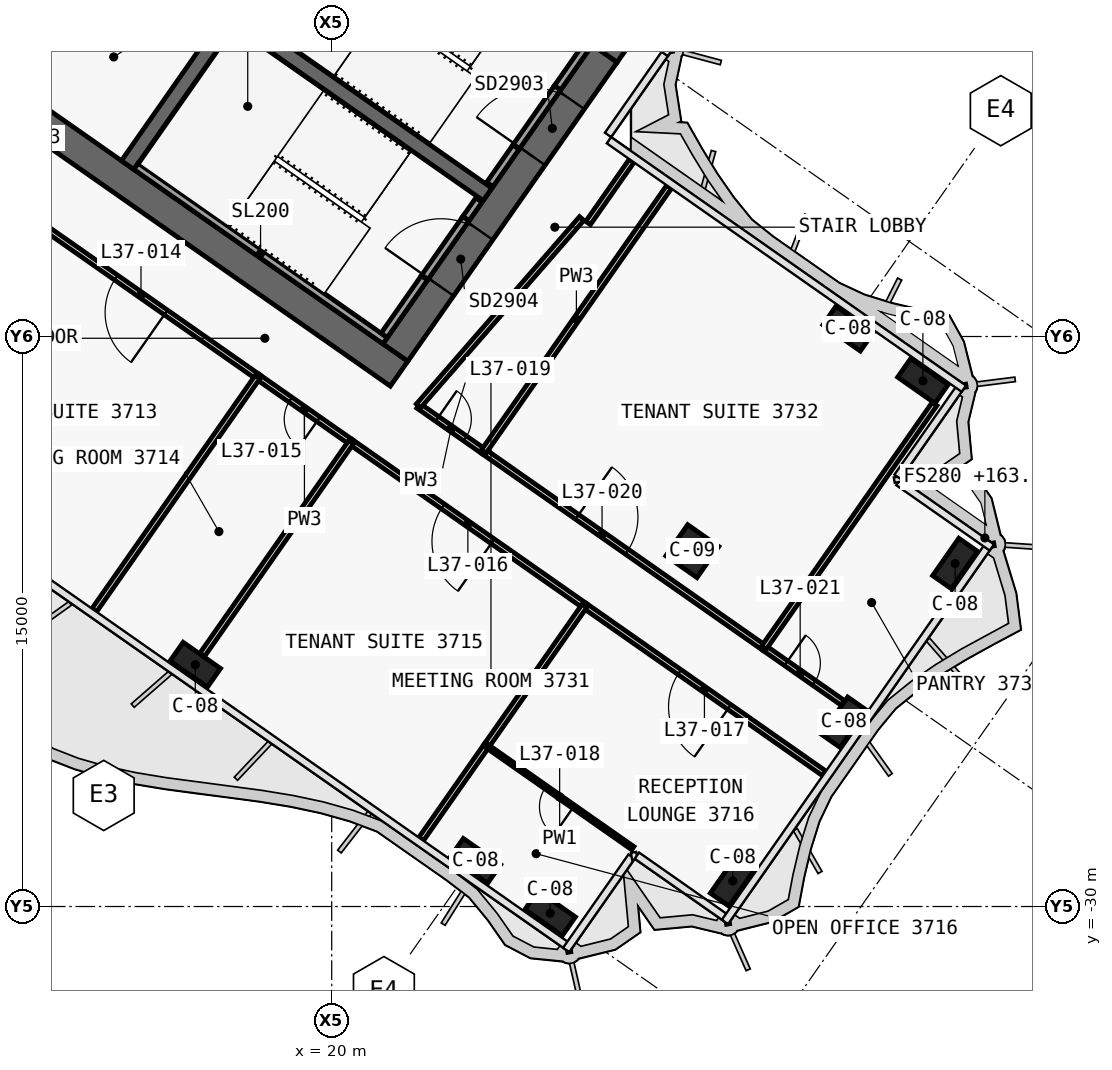
"""IFC4 building model, lengths in metres.
Left out: names, types, materials, properties, quantities, classifications, styles, units other than length and angle.
Written with IfcOpenShell. Run it as: python <this file> out.ifc"""

import sys

from ifc_helpers import new_model, si_unit, direction, frame, frame_2d, origin, origin_2d, place, context, subcontext, project, spatial, polyline, rectangle, outline, extrude, element, fill, save


model = new_model("IFC4")
c1 = context("Model", 3, precision=1e-05, world=origin(), true_north=direction((0.0, 1.0)))
c2 = subcontext(c1, "Body", "Model", "MODEL_VIEW")
j1 = project(units=[si_unit("LENGTHUNIT", "METRE"), si_unit("PLANEANGLEUNIT", "RADIAN")], contexts=[c1])
p1 = place(None, origin())
s1 = spatial("IfcSite", under=j1, at=p1, CompositionType="ELEMENT")
p2 = place(p1, origin())
s2 = spatial("IfcBuilding", under=s1, at=p2, CompositionType="ELEMENT")
p3 = place(p2, frame((0.0, 0.0, 163.2)))
s3 = spatial("IfcBuildingStorey", under=s2, at=p3, CompositionType="ELEMENT", Elevation=163.2)
p4 = place(p3, frame((-0.029, 11.984, 0.0), z_axis=(0.0, 0.0, 1.0), x_axis=(0.819151382952, -0.573577380837, 0.0)))
e1 = element("IfcWall", 1, at=p4, inside=s3, PredefinedType="SHEAR", context=c2, shape_type="SweptSolid", body=[
    extrude(outline(polyline([(33.898, 0.4), (-0.0, 0.4), (0.56, -0.4), (33.898, -0.4), (33.898, 0.4)])), origin(), (0.0, 0.0, 1.0), 3.9),
])
p5 = place(p3, frame((-0.029, -0.712, 0.0), z_axis=(0.0, 0.0, 1.0), x_axis=(0.819151758019, -0.573576845187, 0.0)))
e2 = element("IfcWall", 2, at=p5, inside=s3, PredefinedType="SHEAR", context=c2, shape_type="SweptSolid", body=[
    extrude(outline(polyline([(26.616, 0.4), (-0.0, 0.4), (0.56, -0.4), (26.616, -0.4), (26.616, 0.4)])), origin(), (0.0, 0.0, 1.0), 3.9),
])
p6 = place(p5, frame((6.666, 0.0, 0.0)))
e3 = element("IfcOpeningElement", 3, at=p6, cuts=e2, PredefinedType="OPENING", context=c2, shape_type="SweptSolid", body=[
    extrude(rectangle(XDim=1.5, YDim=2.1, at=frame_2d((0.75, 1.05))), frame((0.0, 0.41, 0.0), z_axis=(0.0, -1.0, 0.0), x_axis=(1.0, 0.0, 0.0)), (0.0, 0.0, 1.0), 0.82),
])
p7 = place(p5, frame((12.366, 0.0, 0.0)))
e4 = element("IfcOpeningElement", 4, at=p7, cuts=e2, PredefinedType="OPENING", context=c2, shape_type="SweptSolid", body=[
    extrude(rectangle(XDim=1.5, YDim=2.1, at=frame_2d((0.75, 1.05))), frame((0.0, 0.41, 0.0), z_axis=(0.0, -1.0, 0.0), x_axis=(1.0, 0.0, 0.0)), (0.0, 0.0, 1.0), 0.82),
])
p8 = place(p3, frame((21.675, -15.421, 0.0), z_axis=(0.0, 0.0, 1.0), x_axis=(0.573581815061, 0.819148278049, 0.0)))
e5 = element("IfcWall", 5, at=p8, inside=s3, PredefinedType="SHEAR", context=c2, shape_type="SweptSolid", body=[
    extrude(outline(polyline([(9.6, 0.4), (0.0, 0.4), (0.0, -0.4), (9.6, -0.4), (9.6, 0.4)])), origin(), (0.0, 0.0, 1.0), 3.9),
])
p9 = place(p8, frame((6.3, 0.0, 0.0)))
e6 = element("IfcOpeningElement", 6, at=p9, cuts=e5, PredefinedType="OPENING", context=c2, shape_type="SweptSolid", body=[
    extrude(rectangle(XDim=1.8, YDim=2.1, at=frame_2d((0.9, 1.05))), frame((0.0, 0.41, 0.0), z_axis=(0.0, -1.0, 0.0), x_axis=(1.0, 0.0, 0.0)), (0.0, 0.0, 1.0), 0.82),
])
p10 = place(p8, frame((2.1, 0.0, 0.0)))
e7 = element("IfcOpeningElement", 7, at=p10, cuts=e5, PredefinedType="OPENING", context=c2, shape_type="SweptSolid", body=[
    extrude(rectangle(XDim=1.8, YDim=2.1, at=frame_2d((0.9, 1.05))), frame((0.0, 0.41, 0.0), z_axis=(0.0, -1.0, 0.0), x_axis=(1.0, 0.0, 0.0)), (0.0, 0.0, 1.0), 0.82),
])
p11 = place(p3, frame((14.63, -10.488, 0.0), z_axis=(0.0, 0.0, 1.0), x_axis=(0.573611936273, 0.819127185829, 0.0)))
e8 = element("IfcWall", 8, at=p11, inside=s3, PredefinedType="SHEAR", context=c2, shape_type="SweptSolid", body=[
    extrude(outline(polyline([(0.0, 0.2), (0.0, -0.2), (4.6, -0.2), (4.6, 0.2), (0.0, 0.2)])), origin(), (0.0, 0.0, 1.0), 3.9),
])
p12 = place(p3, frame((2.638, 3.768, 0.0), z_axis=(0.0, 0.0, 1.0), x_axis=(0.81915267502, -0.573575535572, 0.0)))
e9 = element("IfcWall", 9, at=p12, inside=s3, PredefinedType="SHEAR", context=c2, shape_type="SweptSolid", body=[
    extrude(outline(polyline([(0.0, 0.2), (0.0, -0.2), (26.2, -0.2), (26.2, 0.2), (0.0, 0.2)])), origin(), (0.0, 0.0, 1.0), 3.9),
])
p13 = place(p12, frame((9.637, 0.0, 0.0)))
e10 = element("IfcOpeningElement", 10, at=p13, cuts=e9, PredefinedType="OPENING", context=c2, shape_type="SweptSolid", body=[
    extrude(rectangle(XDim=1.2, YDim=2.1, at=frame_2d((0.6, 1.05))), frame((0.0, 0.21, 0.0), z_axis=(0.0, -1.0, 0.0), x_axis=(1.0, 0.0, 0.0)), (0.0, 0.0, 1.0), 0.42),
])
p14 = place(p12, frame((11.812, 0.0, 0.0)))
e11 = element("IfcOpeningElement", 11, at=p14, cuts=e9, PredefinedType="OPENING", context=c2, shape_type="SweptSolid", body=[
    extrude(rectangle(XDim=1.2, YDim=2.1, at=frame_2d((0.6, 1.05))), frame((0.0, 0.21, 0.0), z_axis=(0.0, -1.0, 0.0), x_axis=(1.0, 0.0, 0.0)), (0.0, 0.0, 1.0), 0.42),
])
p15 = place(p12, frame((13.988, 0.0, 0.0)))
e12 = element("IfcOpeningElement", 12, at=p15, cuts=e9, PredefinedType="OPENING", context=c2, shape_type="SweptSolid", body=[
    extrude(rectangle(XDim=1.2, YDim=2.1, at=frame_2d((0.6, 1.05))), frame((0.0, 0.21, 0.0), z_axis=(0.0, -1.0, 0.0), x_axis=(1.0, 0.0, 0.0)), (0.0, 0.0, 1.0), 0.42),
])
p16 = place(p12, frame((16.262, 0.0, 0.0)))
e13 = element("IfcOpeningElement", 13, at=p16, cuts=e9, PredefinedType="OPENING", context=c2, shape_type="SweptSolid", body=[
    extrude(rectangle(XDim=1.0, YDim=2.1, at=frame_2d((0.5, 1.05))), frame((0.0, 0.21, 0.0), z_axis=(0.0, -1.0, 0.0), x_axis=(1.0, 0.0, 0.0)), (0.0, 0.0, 1.0), 0.42),
])
for number, where, z_axis, x_axis in (
    (14, (16.41, -23.637, 0.0), (0.0, 0.0, 1.0), (0.819, -0.574, 0.0)),
    (15, (23.782, -28.799, 0.0), (0.0, 0.0, 1.0), (0.819, -0.574, 0.0)),
    (16, (25.748, -30.176, 0.0), (0.0, 0.0, 1.0), (0.819, -0.574, 0.0)),
    (17, (33.591, -14.792, 0.0), (0.0, 0.0, 1.0), (0.819, -0.574, 0.0)),
    (18, (35.556, -16.168, 0.0), (0.0, 0.0, 1.0), (0.819, -0.574, 0.0)),
    (19, (30.553, -29.329, 0.0), (0.0, 0.0, 1.0), (0.574, 0.819, 0.0)),
    (20, (33.479, -25.151, 0.0), (0.0, 0.0, 1.0), (0.574, 0.819, 0.0)),
    (21, (36.404, -20.973, 0.0), (0.0, 0.0, 1.0), (0.574, 0.819, 0.0)),
):
    element("IfcColumn", number, at=place(p3, frame(where, z_axis=z_axis, x_axis=x_axis)), inside=s3, PredefinedType="COLUMN", context=c2, shape_type="SweptSolid", body=[
        extrude(rectangle(XDim=1.2, YDim=0.6, at=origin_2d()), origin(), (0.0, 0.0, 1.0), 3.9),
    ])
p17 = place(p3, frame((29.49, -20.649, 0.0), z_axis=(0.0, 0.0, 1.0), x_axis=(0.819152044289, -0.573576436351, 0.0)))
e22 = element("IfcColumn", 22, at=p17, inside=s3, PredefinedType="COLUMN", context=c2, shape_type="SweptSolid", body=[
    extrude(rectangle(XDim=1.0, YDim=1.0, at=origin_2d()), origin(), (0.0, 0.0, 1.0), 3.9),
])
p18 = place(p3, frame((24.162, -10.998, 0.0), z_axis=(0.0, 0.0, 1.0), x_axis=(0.573612502218, 0.819126789514, 0.0)))
e23 = element("IfcWall", 23, at=p18, inside=s3, PredefinedType="SOLIDWALL", context=c2, shape_type="SweptSolid", body=[
    extrude(rectangle(XDim=1.2, YDim=0.2, at=frame_2d((0.6, 0.0))), origin(), (0.0, 0.0, 1.0), 3.62),
])
p19 = place(p3, frame((25.94, -8.458, 0.0), z_axis=(0.0, 0.0, 1.0), x_axis=(0.573619628835, 0.819121798889, 0.0)))
e24 = element("IfcWall", 24, at=p19, inside=s3, PredefinedType="SOLIDWALL", context=c2, shape_type="SweptSolid", body=[
    extrude(rectangle(XDim=1.25, YDim=0.2, at=frame_2d((0.625, 0.0))), origin(), (0.0, 0.0, 1.0), 3.62),
])
p20 = place(p3, frame((24.85, -10.014, 2.15), z_axis=(0.0, 0.0, 1.0), x_axis=(0.573505465124, 0.819201734296, 0.0)))
e25 = element("IfcWall", 25, at=p20, inside=s3, PredefinedType="SOLIDWALL", context=c2, shape_type="SweptSolid", body=[
    extrude(rectangle(XDim=1.9, YDim=0.2, at=frame_2d((0.95, 0.0))), origin(), (0.0, 0.0, 1.0), 1.47),
])
p21 = place(p3, frame((14.851, -10.521, 0.0), z_axis=(0.0, 0.0, 1.0), x_axis=(0.819141584393, -0.57359137434, 0.0)))
e26 = element("IfcWall", 26, at=p21, inside=s3, PredefinedType="SOLIDWALL", context=c2, shape_type="SweptSolid", body=[
    extrude(rectangle(XDim=8.0, YDim=0.2, at=frame_2d((4.0, 0.0))), origin(), (0.0, 0.0, 1.0), 3.62),
])
p22 = place(p3, frame((21.38, -14.97, 0.0), z_axis=(0.0, 0.0, 1.0), x_axis=(0.573559770908, 0.819163713305, 0.0)))
e27 = element("IfcWall", 27, at=p22, inside=s3, PredefinedType="SOLIDWALL", context=c2, shape_type="SweptSolid", body=[
    extrude(rectangle(XDim=1.85, YDim=0.2, at=frame_2d((0.925, 0.0))), origin(), (0.0, 0.0, 1.0), 3.62),
])
p23 = place(p3, frame((23.531, -11.898, 0.0), z_axis=(0.0, 0.0, 1.0), x_axis=(0.573708088123, 0.819059844958, 0.0)))
e28 = element("IfcWall", 28, at=p23, inside=s3, PredefinedType="SOLIDWALL", context=c2, shape_type="SweptSolid", body=[
    extrude(rectangle(XDim=0.6, YDim=0.2, at=frame_2d((0.3, 0.0))), origin(), (0.0, 0.0, 1.0), 3.62),
])
p24 = place(p3, frame((22.441, -13.455, 2.15), z_axis=(0.0, 0.0, 1.0), x_axis=(0.573591692345, 0.819141361715, 0.0)))
e29 = element("IfcWall", 29, at=p24, inside=s3, PredefinedType="SOLIDWALL", context=c2, shape_type="SweptSolid", body=[
    extrude(rectangle(XDim=1.9, YDim=0.2, at=frame_2d((0.95, 0.0))), origin(), (0.0, 0.0, 1.0), 1.47),
])
p25 = place(p3, frame((22.283, -16.824, 0.0), z_axis=(0.0, 0.0, 1.0), x_axis=(0.819182738768, -0.573532597595, 0.0)))
e30 = element("IfcWall", 30, at=p25, inside=s3, PredefinedType="PARTITIONING", context=c2, shape_type="SweptSolid", body=[
    extrude(rectangle(XDim=2.099, YDim=0.15, at=frame_2d((1.05, 0.0))), origin(), (0.0, 0.0, 1.0), 3.0),
])
p26 = place(p25, frame((0.6, 0.0, 0.0)))
e31 = element("IfcOpeningElement", 31, at=p26, cuts=e30, PredefinedType="OPENING", context=c2, shape_type="SweptSolid", body=[
    extrude(rectangle(XDim=0.9, YDim=2.1, at=frame_2d((0.45, 1.05))), frame((0.0, 0.085, 0.0), z_axis=(0.0, -1.0, 0.0), x_axis=(1.0, 0.0, 0.0)), (0.0, 0.0, 1.0), 0.17),
])
p27 = place(p3, frame((23.999, -18.025, 0.0), z_axis=(0.0, 0.0, 1.0), x_axis=(0.819164400877, -0.57355878891, 0.0)))
e32 = element("IfcWall", 32, at=p27, inside=s3, PredefinedType="PARTITIONING", context=c2, shape_type="SweptSolid", body=[
    extrude(rectangle(XDim=9.004, YDim=0.15, at=frame_2d((4.502, 0.0))), origin(), (0.0, 0.0, 1.0), 3.0),
])
p28 = place(p27, frame((3.002, 0.0, 0.0)))
e33 = element("IfcOpeningElement", 33, at=p28, cuts=e32, PredefinedType="OPENING", context=c2, shape_type="SweptSolid", body=[
    extrude(rectangle(XDim=1.6, YDim=2.1, at=frame_2d((0.8, 1.05))), frame((0.0, 0.085, 0.0), z_axis=(0.0, -1.0, 0.0), x_axis=(1.0, 0.0, 0.0)), (0.0, 0.0, 1.0), 0.17),
])
p29 = place(p3, frame((31.372, -23.188, 0.0), z_axis=(0.0, 0.0, 1.0), x_axis=(0.819150379241, -0.573578814278, 0.0)))
e34 = element("IfcWall", 34, at=p29, inside=s3, PredefinedType="PARTITIONING", context=c2, shape_type="SweptSolid", body=[
    extrude(rectangle(XDim=2.532, YDim=0.15, at=frame_2d((1.266, 0.0))), origin(), (0.0, 0.0, 1.0), 3.0),
])
p30 = place(p29, frame((0.716, 0.0, 0.0)))
e35 = element("IfcOpeningElement", 35, at=p30, cuts=e34, PredefinedType="OPENING", context=c2, shape_type="SweptSolid", body=[
    extrude(rectangle(XDim=0.9, YDim=2.1, at=frame_2d((0.45, 1.05))), frame((0.0, 0.085, 0.0), z_axis=(0.0, -1.0, 0.0), x_axis=(1.0, 0.0, 0.0)), (0.0, 0.0, 1.0), 0.17),
])
p31 = place(p3, frame((18.055, -16.061, 0.0), z_axis=(0.0, 0.0, 1.0), x_axis=(-0.819164661457, 0.573558416746, 0.0)))
e36 = element("IfcWall", 36, at=p31, inside=s3, PredefinedType="PARTITIONING", context=c2, shape_type="SweptSolid", body=[
    extrude(rectangle(XDim=7.504, YDim=0.15, at=frame_2d((3.752, 0.0))), origin(), (0.0, 0.0, 1.0), 3.0),
])
p32 = place(p31, frame((2.952, 0.0, 0.0)))
e37 = element("IfcOpeningElement", 37, at=p32, cuts=e36, PredefinedType="OPENING", context=c2, shape_type="SweptSolid", body=[
    extrude(rectangle(XDim=1.6, YDim=2.1, at=frame_2d((0.8, 1.05))), frame((0.0, 0.085, 0.0), z_axis=(0.0, -1.0, 0.0), x_axis=(1.0, 0.0, 0.0)), (0.0, 0.0, 1.0), 0.17),
])
p33 = place(p3, frame((20.513, -17.781, 0.0), z_axis=(0.0, 0.0, 1.0), x_axis=(-0.819128818764, 0.573609604409, 0.0)))
e38 = element("IfcWall", 38, at=p33, inside=s3, PredefinedType="PARTITIONING", context=c2, shape_type="SweptSolid", body=[
    extrude(rectangle(XDim=3.004, YDim=0.15, at=frame_2d((1.502, 0.0))), origin(), (0.0, 0.0, 1.0), 3.0),
])
p34 = place(p33, frame((1.052, 0.0, 0.0)))
e39 = element("IfcOpeningElement", 39, at=p34, cuts=e38, PredefinedType="OPENING", context=c2, shape_type="SweptSolid", body=[
    extrude(rectangle(XDim=0.9, YDim=2.1, at=frame_2d((0.45, 1.05))), frame((0.0, 0.085, 0.0), z_axis=(0.0, -1.0, 0.0), x_axis=(1.0, 0.0, 0.0)), (0.0, 0.0, 1.0), 0.17),
])
p35 = place(p3, frame((26.656, -22.083, 0.0), z_axis=(0.0, 0.0, 1.0), x_axis=(-0.819138671238, 0.573595534573, 0.0)))
e40 = element("IfcWall", 40, at=p35, inside=s3, PredefinedType="PARTITIONING", context=c2, shape_type="SweptSolid", body=[
    extrude(rectangle(XDim=7.504, YDim=0.15, at=frame_2d((3.752, 0.0))), origin(), (0.0, 0.0, 1.0), 3.0),
])
p36 = place(p35, frame((2.952, 0.0, 0.0)))
e41 = element("IfcOpeningElement", 41, at=p36, cuts=e40, PredefinedType="OPENING", context=c2, shape_type="SweptSolid", body=[
    extrude(rectangle(XDim=1.6, YDim=2.1, at=frame_2d((0.8, 1.05))), frame((0.0, 0.085, 0.0), z_axis=(0.0, -1.0, 0.0), x_axis=(1.0, 0.0, 0.0)), (0.0, 0.0, 1.0), 0.17),
])
p37 = place(p3, frame((32.962, -26.499, 0.0), z_axis=(0.0, 0.0, 1.0), x_axis=(-0.819148517565, 0.573581473003, 0.0)))
e42 = element("IfcWall", 42, at=p37, inside=s3, PredefinedType="PARTITIONING", context=c2, shape_type="SweptSolid", body=[
    extrude(rectangle(XDim=7.702, YDim=0.15, at=frame_2d((3.851, 0.0))), origin(), (0.0, 0.0, 1.0), 2.9),
])
p38 = place(p37, frame((3.051, 0.0, 0.0)))
e43 = element("IfcOpeningElement", 43, at=p38, cuts=e42, PredefinedType="OPENING", context=c2, shape_type="SweptSolid", body=[
    extrude(rectangle(XDim=1.6, YDim=2.1, at=frame_2d((0.8, 1.05))), frame((0.0, 0.085, 0.0), z_axis=(0.0, -1.0, 0.0), x_axis=(1.0, 0.0, 0.0)), (0.0, 0.0, 1.0), 0.17),
])
p39 = place(p3, frame((28.876, -11.064, 0.0), z_axis=(0.0, 0.0, 1.0), x_axis=(-0.573591492816, -0.819141501433, 0.0)))
e44 = element("IfcWall", 44, at=p39, inside=s3, PredefinedType="PARTITIONING", context=c2, shape_type="SweptSolid", body=[
    extrude(rectangle(XDim=8.5, YDim=0.15, at=frame_2d((4.25, 0.0))), origin(), (0.0, 0.0, 1.0), 3.0),
])
p40 = place(p3, frame((22.285, -16.825, 0.0), z_axis=(0.0, 0.0, 1.0), x_axis=(0.656781429942, 0.754080999153, 0.0)))
e45 = element("IfcWall", 45, at=p40, inside=s3, PredefinedType="PARTITIONING", context=c2, shape_type="SweptSolid", body=[
    extrude(rectangle(XDim=6.536, YDim=0.15, at=frame_2d((3.268, 0.0))), origin(), (0.0, 0.0, 1.0), 3.0),
])
p41 = place(p3, frame((26.746, -12.014, 0.0), z_axis=(0.0, 0.0, 1.0), x_axis=(0.573568836472, 0.819157365729, 0.0)))
e46 = element("IfcWall", 46, at=p41, inside=s3, PredefinedType="PARTITIONING", context=c2, shape_type="SweptSolid", body=[
    extrude(rectangle(XDim=2.0, YDim=0.15, at=frame_2d((1.0, 0.0))), origin(), (0.0, 0.0, 1.0), 3.0),
])
p42 = place(p3, frame((35.865, -16.775, 0.0), z_axis=(0.0, 0.0, 1.0), x_axis=(-0.573579523489, -0.819149882643, 0.0)))
e47 = element("IfcWall", 47, at=p42, inside=s3, PredefinedType="PARTITIONING", context=c2, shape_type="SweptSolid", body=[
    extrude(rectangle(XDim=7.83, YDim=0.15, at=frame_2d((3.915, 0.0))), origin(), (0.0, 0.0, 1.0), 2.9),
])
p43 = place(p3, frame((18.054, -16.06, 0.0), z_axis=(0.0, 0.0, 1.0), x_axis=(-0.573597787563, -0.819137093595, 0.0)))
e48 = element("IfcWall", 48, at=p43, inside=s3, PredefinedType="PARTITIONING", context=c2, shape_type="SweptSolid", body=[
    extrude(rectangle(XDim=7.5, YDim=0.15, at=frame_2d((3.75, 0.0))), origin(), (0.0, 0.0, 1.0), 2.9),
])
p44 = place(p3, frame((20.511, -17.78, 0.0), z_axis=(0.0, 0.0, 1.0), x_axis=(-0.573577493031, -0.819151304393, 0.0)))
e49 = element("IfcWall", 49, at=p44, inside=s3, PredefinedType="PARTITIONING", context=c2, shape_type="SweptSolid", body=[
    extrude(rectangle(XDim=6.83, YDim=0.15, at=frame_2d((3.415, 0.0))), origin(), (0.0, 0.0, 1.0), 3.0),
])
p45 = place(p3, frame((24.074, -25.767, 0.0), z_axis=(0.0, 0.0, 1.0), x_axis=(-0.573609750632, -0.819128716369, 0.0)))
e50 = element("IfcWall", 50, at=p45, inside=s3, PredefinedType="PARTITIONING", context=c2, shape_type="SweptSolid", body=[
    extrude(rectangle(XDim=3.001, YDim=0.15, at=frame_2d((1.5, 0.0))), origin(), (0.0, 0.0, 1.0), 2.9),
])
p46 = place(p3, frame((26.655, -22.082, 0.0), z_axis=(0.0, 0.0, 1.0), x_axis=(-0.573589723117, -0.819142740634, 0.0)))
e51 = element("IfcWall", 51, at=p46, inside=s3, PredefinedType="PARTITIONING", context=c2, shape_type="SweptSolid", body=[
    extrude(rectangle(XDim=4.502, YDim=0.15, at=frame_2d((2.251, 0.0))), origin(), (0.0, 0.0, 1.0), 3.62),
])
p47 = place(p3, frame((27.923, -28.465, 0.0), z_axis=(0.0, 0.0, 1.0), x_axis=(-0.819158704016, 0.573566925158, 0.0)))
e52 = element("IfcWall", 52, at=p47, inside=s3, PredefinedType="PARTITIONING", context=c2, shape_type="SweptSolid", body=[
    extrude(rectangle(XDim=4.7, YDim=0.1, at=frame_2d((2.35, 0.0))), origin(), (0.0, 0.0, 1.0), 3.0),
])
p48 = place(p47, frame((1.9, 0.0, 0.0)))
e53 = element("IfcOpeningElement", 53, at=p48, cuts=e52, PredefinedType="OPENING", context=c2, shape_type="SweptSolid", body=[
    extrude(rectangle(XDim=0.9, YDim=2.1, at=frame_2d((0.45, 1.05))), frame((0.0, 0.06, 0.0), z_axis=(0.0, -1.0, 0.0), x_axis=(1.0, 0.0, 0.0)), (0.0, 0.0, 1.0), 0.12),
])
p49 = place(p9, origin())
e54 = element("IfcDoor", 54, at=p49, inside=s3, OperationType="DOUBLE_DOOR_SINGLE_SWING", PredefinedType="DOOR", context=c2, shape_type="SweptSolid", body=[
    extrude(rectangle(XDim=1.8, YDim=2.1, at=frame_2d((0.9, 1.05))), frame((0.0, 0.025, 0.0), z_axis=(0.0, -1.0, 0.0), x_axis=(1.0, 0.0, 0.0)), (0.0, 0.0, 1.0), 0.05),
])
fill(e6, e54)
p50 = place(p10, origin())
e55 = element("IfcDoor", 55, at=p50, inside=s3, OperationType="DOUBLE_DOOR_SINGLE_SWING", PredefinedType="DOOR", context=c2, shape_type="SweptSolid", body=[
    extrude(rectangle(XDim=1.8, YDim=2.1, at=frame_2d((0.9, 1.05))), frame((0.0, 0.025, 0.0), z_axis=(0.0, -1.0, 0.0), x_axis=(1.0, 0.0, 0.0)), (0.0, 0.0, 1.0), 0.05),
])
fill(e7, e55)
p51 = place(p32, origin())
e56 = element("IfcDoor", 56, at=p51, inside=s3, OperationType="DOUBLE_DOOR_SINGLE_SWING", PredefinedType="DOOR", context=c2, shape_type="SweptSolid", body=[
    extrude(rectangle(XDim=1.6, YDim=2.1, at=frame_2d((0.8, 1.05))), frame((0.0, 0.025, 0.0), z_axis=(0.0, -1.0, 0.0), x_axis=(1.0, 0.0, 0.0)), (0.0, 0.0, 1.0), 0.05),
])
fill(e37, e56)
p52 = place(p34, origin())
e57 = element("IfcDoor", 57, at=p52, inside=s3, OperationType="SINGLE_SWING_RIGHT", PredefinedType="DOOR", context=c2, shape_type="SweptSolid", body=[
    extrude(rectangle(XDim=0.9, YDim=2.1, at=frame_2d((0.45, 1.05))), frame((0.0, 0.025, 0.0), z_axis=(0.0, -1.0, 0.0), x_axis=(1.0, 0.0, 0.0)), (0.0, 0.0, 1.0), 0.05),
])
fill(e39, e57)
p53 = place(p36, origin())
e58 = element("IfcDoor", 58, at=p53, inside=s3, OperationType="DOUBLE_DOOR_SINGLE_SWING", PredefinedType="DOOR", context=c2, shape_type="SweptSolid", body=[
    extrude(rectangle(XDim=1.6, YDim=2.1, at=frame_2d((0.8, 1.05))), frame((0.0, 0.025, 0.0), z_axis=(0.0, -1.0, 0.0), x_axis=(1.0, 0.0, 0.0)), (0.0, 0.0, 1.0), 0.05),
])
fill(e41, e58)
p54 = place(p38, origin())
e59 = element("IfcDoor", 59, at=p54, inside=s3, OperationType="DOUBLE_DOOR_SINGLE_SWING", PredefinedType="DOOR", context=c2, shape_type="SweptSolid", body=[
    extrude(rectangle(XDim=1.6, YDim=2.1, at=frame_2d((0.8, 1.05))), frame((0.0, 0.025, 0.0), z_axis=(0.0, -1.0, 0.0), x_axis=(1.0, 0.0, 0.0)), (0.0, 0.0, 1.0), 0.05),
])
fill(e43, e59)
p55 = place(p48, origin())
e60 = element("IfcDoor", 60, at=p55, inside=s3, OperationType="SINGLE_SWING_RIGHT", PredefinedType="DOOR", context=c2, shape_type="SweptSolid", body=[
    extrude(rectangle(XDim=0.9, YDim=2.1, at=frame_2d((0.45, 1.05))), frame((0.0, 0.025, 0.0), z_axis=(0.0, -1.0, 0.0), x_axis=(1.0, 0.0, 0.0)), (0.0, 0.0, 1.0), 0.05),
])
fill(e53, e60)
p56 = place(p26, origin())
e61 = element("IfcDoor", 61, at=p56, inside=s3, OperationType="SINGLE_SWING_LEFT", PredefinedType="DOOR", context=c2, shape_type="SweptSolid", body=[
    extrude(rectangle(XDim=0.9, YDim=2.1, at=frame_2d((0.45, 1.05))), frame((0.0, 0.025, 0.0), z_axis=(0.0, -1.0, 0.0), x_axis=(1.0, 0.0, 0.0)), (0.0, 0.0, 1.0), 0.05),
])
fill(e31, e61)
p57 = place(p28, origin())
e62 = element("IfcDoor", 62, at=p57, inside=s3, OperationType="DOUBLE_DOOR_SINGLE_SWING", PredefinedType="DOOR", context=c2, shape_type="SweptSolid", body=[
    extrude(rectangle(XDim=1.6, YDim=2.1, at=frame_2d((0.8, 1.05))), frame((0.0, 0.025, 0.0), z_axis=(0.0, -1.0, 0.0), x_axis=(1.0, 0.0, 0.0)), (0.0, 0.0, 1.0), 0.05),
])
fill(e33, e62)
p58 = place(p30, origin())
e63 = element("IfcDoor", 63, at=p58, inside=s3, OperationType="SINGLE_SWING_LEFT", PredefinedType="DOOR", context=c2, shape_type="SweptSolid", body=[
    extrude(rectangle(XDim=0.9, YDim=2.1, at=frame_2d((0.45, 1.05))), frame((0.0, 0.025, 0.0), z_axis=(0.0, -1.0, 0.0), x_axis=(1.0, 0.0, 0.0)), (0.0, 0.0, 1.0), 0.05),
])
fill(e35, e63)
save(model, sys.argv[1])
